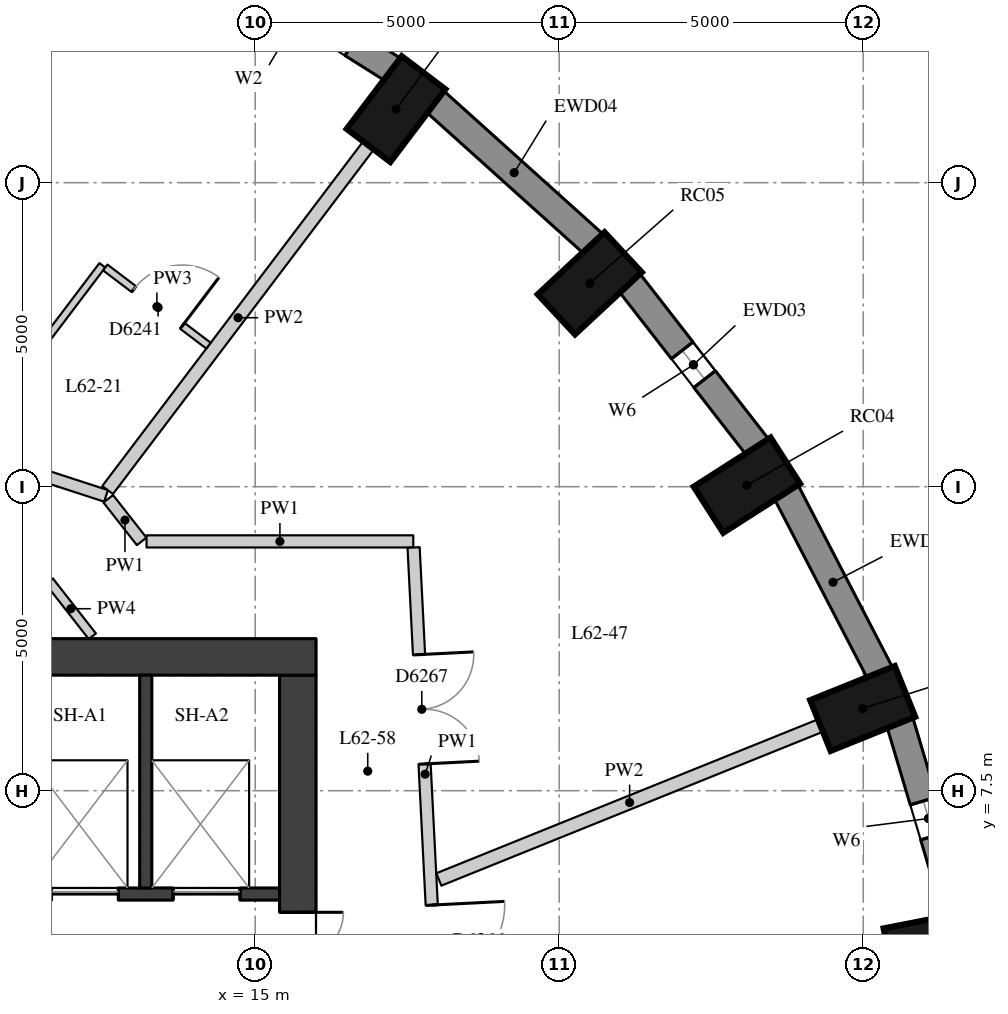
"""IFC4 building model, lengths in metres.
Left out: names, types, materials, properties, quantities, classifications, styles, units other than length and angle.
Written with IfcOpenShell. Run it as: python <this file> out.ifc"""

import sys

from ifc_helpers import new_model, si_unit, direction, frame, frame_2d, origin, origin_2d, place, context, subcontext, project, spatial, rectangle, extrude, element, fill, save


model = new_model("IFC4")
c1 = context("Model", 3, precision=1e-05, world=origin(), true_north=direction((0.0, 1.0)))
c2 = subcontext(c1, "Body", "Model", "MODEL_VIEW")
j1 = project(units=[si_unit("LENGTHUNIT", "METRE"), si_unit("PLANEANGLEUNIT", "RADIAN")], contexts=[c1])
p1 = place(None, origin())
s1 = spatial("IfcSite", under=j1, at=p1, CompositionType="ELEMENT")
p2 = place(p1, origin())
s2 = spatial("IfcBuilding", under=s1, at=p2, CompositionType="ELEMENT")
p3 = place(p2, frame((0.0, 0.0, 218.9)))
s3 = spatial("IfcBuildingStorey", under=s2, at=p3, CompositionType="ELEMENT", Elevation=218.9)
for number, where, z_axis, x_axis in (
    (1, (26.157, 4.937, 0.0), (0.0, 0.0, 1.0), (0.981, 0.192, 0.0)),
    (2, (24.991, 8.852, 0.0), (0.0, 0.0, 1.0), (0.927, 0.374, 0.0)),
    (3, (23.087, 12.525, 0.0), (0.0, 0.0, 1.0), (0.842, 0.539, 0.0)),
    (4, (20.502, 15.845, 0.0), (0.0, 0.0, 1.0), (0.732, 0.681, 0.0)),
    (5, (17.316, 18.71, 0.0), (0.0, 0.0, 1.0), (0.604, 0.797, 0.0)),
):
    element("IfcColumn", number, at=place(p3, frame(where, z_axis=z_axis, x_axis=x_axis)), inside=s3, PredefinedType="COLUMN", context=c2, shape_type="SweptSolid", body=[
        extrude(rectangle(XDim=1.5, YDim=0.9, at=origin_2d()), origin(), (0.0, 0.0, 1.0), 3.3),
    ])
p4 = place(p3, frame((26.548, 5.452, 0.0), z_axis=(0.0, 0.0, 1.0), x_axis=(-0.285444972963, 0.958395099847, 0.0)))
e6 = element("IfcWall", 6, at=p4, inside=s3, PredefinedType="SOLIDWALL", context=c2, shape_type="SweptSolid", body=[
    extrude(rectangle(XDim=3.32, YDim=0.45, at=frame_2d((1.66, 0.0))), origin(), (0.0, 0.0, 1.0), 3.02),
])
p5 = place(p4, frame((1.36, 0.0, 0.4)))
e7 = element("IfcOpeningElement", 7, at=p5, cuts=e6, PredefinedType="OPENING", context=c2, shape_type="SweptSolid", body=[
    extrude(rectangle(XDim=0.6, YDim=1.75, at=frame_2d((0.3, 0.875))), frame((0.0, 0.235, 0.0), z_axis=(0.0, -1.0, 0.0), x_axis=(1.0, 0.0, 0.0)), (0.0, 0.0, 1.0), 0.47),
])
p6 = place(p3, frame((25.278, 9.432, 0.0), z_axis=(0.0, 0.0, 1.0), x_axis=(-0.460175500475, 0.887827972505, 0.0)))
e8 = element("IfcWall", 8, at=p6, inside=s3, PredefinedType="SOLIDWALL", context=c2, shape_type="SweptSolid", body=[
    extrude(rectangle(XDim=3.371, YDim=0.45, at=frame_2d((1.685, 0.0))), origin(), (0.0, 0.0, 1.0), 3.02),
])
p7 = place(p3, frame((23.263, 13.148, 0.0), z_axis=(0.0, 0.0, 1.0), x_axis=(-0.614220816451, 0.789134201919, 0.0)))
e9 = element("IfcWall", 9, at=p7, inside=s3, PredefinedType="SOLIDWALL", context=c2, shape_type="SweptSolid", body=[
    extrude(rectangle(XDim=3.438, YDim=0.45, at=frame_2d((1.719, 0.0))), origin(), (0.0, 0.0, 1.0), 3.02),
])
p8 = place(p7, frame((1.419, 0.0, 0.4)))
e10 = element("IfcOpeningElement", 10, at=p8, cuts=e9, PredefinedType="OPENING", context=c2, shape_type="SweptSolid", body=[
    extrude(rectangle(XDim=0.6, YDim=1.75, at=frame_2d((0.3, 0.875))), frame((0.0, 0.235, 0.0), z_axis=(0.0, -1.0, 0.0), x_axis=(1.0, 0.0, 0.0)), (0.0, 0.0, 1.0), 0.47),
])
p9 = place(p3, frame((20.565, 16.49, 0.0), z_axis=(0.0, 0.0, 1.0), x_axis=(-0.743442727602, 0.668799604348, 0.0)))
e11 = element("IfcWall", 11, at=p9, inside=s3, PredefinedType="SOLIDWALL", context=c2, shape_type="SweptSolid", body=[
    extrude(rectangle(XDim=3.513, YDim=0.45, at=frame_2d((1.756, 0.0))), origin(), (0.0, 0.0, 1.0), 3.02),
])
p10 = place(p3, frame((17.267, 19.358, 0.0), z_axis=(0.0, 0.0, 1.0), x_axis=(-0.846119146727, 0.532993798783, 0.0)))
e12 = element("IfcWall", 12, at=p10, inside=s3, PredefinedType="SOLIDWALL", context=c2, shape_type="SweptSolid", body=[
    extrude(rectangle(XDim=3.587, YDim=0.45, at=frame_2d((1.793, 0.0))), origin(), (0.0, 0.0, 1.0), 3.02),
])
p11 = place(p10, frame((0.793, 0.0, 0.4)))
e13 = element("IfcOpeningElement", 13, at=p11, cuts=e12, PredefinedType="OPENING", context=c2, shape_type="SweptSolid", body=[
    extrude(rectangle(XDim=2.0, YDim=1.75, at=frame_2d((1.0, 0.875))), frame((0.0, 0.235, 0.0), z_axis=(0.0, -1.0, 0.0), x_axis=(1.0, 0.0, 0.0)), (0.0, 0.0, 1.0), 0.47),
])
p12 = place(p3, frame((15.7, -9.4, 0.0), z_axis=(0.0, 0.0, 1.0), x_axis=(0.0, 1.0, 0.0)))
e14 = element("IfcWall", 14, at=p12, inside=s3, PredefinedType="SHEAR", context=c2, shape_type="SweptSolid", body=[
    extrude(rectangle(XDim=18.8, YDim=0.6, at=frame_2d((9.4, 0.0))), origin(), (0.0, 0.0, 1.0), 3.02),
])
p13 = place(p12, frame((13.4, 0.0, 0.0)))
e15 = element("IfcOpeningElement", 15, at=p13, cuts=e14, PredefinedType="OPENING", context=c2, shape_type="SweptSolid", body=[
    extrude(rectangle(XDim=1.5, YDim=2.1, at=frame_2d((0.75, 1.05))), frame((0.0, 0.31, 0.0), z_axis=(0.0, -1.0, 0.0), x_axis=(1.0, 0.0, 0.0)), (0.0, 0.0, 1.0), 0.62),
])
p14 = place(p12, frame((3.9, 0.0, 0.0)))
e16 = element("IfcOpeningElement", 16, at=p14, cuts=e14, PredefinedType="OPENING", context=c2, shape_type="SweptSolid", body=[
    extrude(rectangle(XDim=1.5, YDim=2.1, at=frame_2d((0.75, 1.05))), frame((0.0, 0.31, 0.0), z_axis=(0.0, -1.0, 0.0), x_axis=(1.0, 0.0, 0.0)), (0.0, 0.0, 1.0), 0.62),
])
p15 = place(p3, frame((4.0, 9.7, 0.0), z_axis=(0.0, 0.0, 1.0), x_axis=(1.0, 0.0, 0.0)))
e17 = element("IfcWall", 17, at=p15, inside=s3, PredefinedType="SHEAR", context=c2, shape_type="SweptSolid", body=[
    extrude(rectangle(XDim=12.0, YDim=0.6, at=frame_2d((6.0, 0.0))), origin(), (0.0, 0.0, 1.0), 3.02),
])
p16 = place(p3, frame((4.6, 5.8, 0.0), z_axis=(0.0, 0.0, 1.0), x_axis=(1.0, 0.0, 0.0)))
e18 = element("IfcWall", 18, at=p16, inside=s3, PredefinedType="SHEAR", context=c2, shape_type="SweptSolid", body=[
    extrude(rectangle(XDim=10.8, YDim=0.2, at=frame_2d((5.4, 0.0))), origin(), (0.0, 0.0, 1.0), 3.02),
])
p17 = place(p16, frame((7.05, 0.0, 0.0)))
e19 = element("IfcOpeningElement", 19, at=p17, cuts=e18, PredefinedType="OPENING", context=c2, shape_type="SweptSolid", body=[
    extrude(rectangle(XDim=1.1, YDim=2.1, at=frame_2d((0.55, 1.05))), frame((0.0, 0.11, 0.0), z_axis=(0.0, -1.0, 0.0), x_axis=(1.0, 0.0, 0.0)), (0.0, 0.0, 1.0), 0.22),
])
p18 = place(p16, frame((9.05, 0.0, 0.0)))
e20 = element("IfcOpeningElement", 20, at=p18, cuts=e18, PredefinedType="OPENING", context=c2, shape_type="SweptSolid", body=[
    extrude(rectangle(XDim=1.1, YDim=2.1, at=frame_2d((0.55, 1.05))), frame((0.0, 0.11, 0.0), z_axis=(0.0, -1.0, 0.0), x_axis=(1.0, 0.0, 0.0)), (0.0, 0.0, 1.0), 0.22),
])
p19 = place(p3, frame((13.2, 5.9, 0.0), z_axis=(0.0, 0.0, 1.0), x_axis=(0.0, 1.0, 0.0)))
e21 = element("IfcWall", 21, at=p19, inside=s3, PredefinedType="SHEAR", context=c2, shape_type="SweptSolid", body=[
    extrude(rectangle(XDim=3.5, YDim=0.2, at=frame_2d((1.75, 0.0))), origin(), (0.0, 0.0, 1.0), 3.02),
])
p20 = place(p3, frame((0.795, 16.169, 0.0), z_axis=(0.0, 0.0, 1.0), x_axis=(0.950998491074, -0.309195520626, 0.0)))
e22 = element("IfcWall", 22, at=p20, inside=s3, PredefinedType="PARTITIONING", context=c2, shape_type="SweptSolid", body=[
    extrude(rectangle(XDim=12.357, YDim=0.2, at=frame_2d((6.179, 0.0))), origin(), (0.0, 0.0, 1.0), 3.02),
])
p21 = place(p20, frame((8.496, 0.0, 0.0)))
e23 = element("IfcOpeningElement", 23, at=p21, cuts=e22, PredefinedType="OPENING", context=c2, shape_type="SweptSolid", body=[
    extrude(rectangle(XDim=1.1, YDim=2.1, at=frame_2d((0.55, 1.05))), frame((0.0, 0.11, 0.0), z_axis=(0.0, -1.0, 0.0), x_axis=(1.0, 0.0, 0.0)), (0.0, 0.0, 1.0), 0.22),
])
p22 = place(p20, frame((4.169, 0.0, 0.0)))
e24 = element("IfcOpeningElement", 24, at=p22, cuts=e22, PredefinedType="OPENING", context=c2, shape_type="SweptSolid", body=[
    extrude(rectangle(XDim=0.9, YDim=2.1, at=frame_2d((0.45, 1.05))), frame((0.0, 0.11, 0.0), z_axis=(0.0, -1.0, 0.0), x_axis=(1.0, 0.0, 0.0)), (0.0, 0.0, 1.0), 0.22),
])
p23 = place(p20, frame((0.747, 0.0, 0.0)))
e25 = element("IfcOpeningElement", 25, at=p23, cuts=e22, PredefinedType="OPENING", context=c2, shape_type="SweptSolid", body=[
    extrude(rectangle(XDim=0.9, YDim=2.1, at=frame_2d((0.45, 1.05))), frame((0.0, 0.11, 0.0), z_axis=(0.0, -1.0, 0.0), x_axis=(1.0, 0.0, 0.0)), (0.0, 0.0, 1.0), 0.22),
])
p24 = place(p3, frame((12.583, 12.301, 0.0), z_axis=(0.0, 0.0, 1.0), x_axis=(0.616670471626, -0.787221397972, 0.0)))
e26 = element("IfcWall", 26, at=p24, inside=s3, PredefinedType="PARTITIONING", context=c2, shape_type="SweptSolid", body=[
    extrude(rectangle(XDim=0.89, YDim=0.2, at=frame_2d((0.445, 0.0))), origin(), (0.0, 0.0, 1.0), 3.02),
])
p25 = place(p3, frame((13.213, 11.6, 0.0), z_axis=(0.0, 0.0, 1.0), x_axis=(1.0, 0.0, 0.0)))
e27 = element("IfcWall", 27, at=p25, inside=s3, PredefinedType="PARTITIONING", context=c2, shape_type="SweptSolid", body=[
    extrude(rectangle(XDim=4.387, YDim=0.2, at=frame_2d((2.194, 0.0))), origin(), (0.0, 0.0, 1.0), 3.02),
])
p26 = place(p3, frame((17.605, 11.5, 0.0), z_axis=(0.0, 0.0, 1.0), x_axis=(0.050646981223, -0.998716618112, 0.0)))
e28 = element("IfcWall", 28, at=p26, inside=s3, PredefinedType="PARTITIONING", context=c2, shape_type="SweptSolid", body=[
    extrude(rectangle(XDim=7.467, YDim=0.2, at=frame_2d((3.733, 0.0))), origin(), (0.0, 0.0, 1.0), 3.02),
])
p27 = place(p26, frame((5.889, 0.0, 0.0)))
e29 = element("IfcOpeningElement", 29, at=p27, cuts=e28, PredefinedType="OPENING", context=c2, shape_type="SweptSolid", body=[
    extrude(rectangle(XDim=1.2, YDim=2.1, at=frame_2d((0.6, 1.05))), frame((0.0, 0.11, 0.0), z_axis=(0.0, -1.0, 0.0), x_axis=(1.0, 0.0, 0.0)), (0.0, 0.0, 1.0), 0.22),
])
p28 = place(p26, frame((1.765, 0.0, 0.0)))
e30 = element("IfcOpeningElement", 30, at=p28, cuts=e28, PredefinedType="OPENING", context=c2, shape_type="SweptSolid", body=[
    extrude(rectangle(XDim=1.8, YDim=2.1, at=frame_2d((0.9, 1.05))), frame((0.0, 0.11, 0.0), z_axis=(0.0, -1.0, 0.0), x_axis=(1.0, 0.0, 0.0)), (0.0, 0.0, 1.0), 0.22),
])
p29 = place(p3, frame((11.612, 10.946, 0.0), z_axis=(0.0, 0.0, 1.0), x_axis=(0.616228210046, -0.787567643535, 0.0)))
e31 = element("IfcWall", 31, at=p29, inside=s3, PredefinedType="PARTITIONING", context=c2, shape_type="SweptSolid", body=[
    extrude(rectangle(XDim=1.151, YDim=0.15, at=frame_2d((0.576, 0.0))), origin(), (0.0, 0.0, 1.0), 3.02),
])
p30 = place(p3, frame((24.295, 8.571, 0.0), z_axis=(0.0, 0.0, 1.0), x_axis=(-0.927397869515, -0.374076451569, 0.0)))
e32 = element("IfcWall", 32, at=p30, inside=s3, PredefinedType="PARTITIONING", context=c2, shape_type="SweptSolid", body=[
    extrude(rectangle(XDim=6.767, YDim=0.22, at=frame_2d((3.383, 0.0))), origin(), (0.0, 0.0, 1.0), 3.02),
])
p31 = place(p3, frame((16.863, 18.113, 0.0), z_axis=(0.0, 0.0, 1.0), x_axis=(-0.603604387564, -0.79728397909, 0.0)))
e33 = element("IfcWall", 33, at=p31, inside=s3, PredefinedType="PARTITIONING", context=c2, shape_type="SweptSolid", body=[
    extrude(rectangle(XDim=7.108, YDim=0.22, at=frame_2d((3.554, 0.0))), origin(), (0.0, 0.0, 1.0), 3.02),
])
p32 = place(p3, frame((10.27, 13.214, 0.0), z_axis=(0.0, 0.0, 1.0), x_axis=(0.603632344714, 0.797262812638, 0.0)))
e34 = element("IfcWall", 34, at=p32, inside=s3, PredefinedType="PARTITIONING", context=c2, shape_type="SweptSolid", body=[
    extrude(rectangle(XDim=3.672, YDim=0.12, at=frame_2d((1.836, 0.0))), origin(), (0.0, 0.0, 1.0), 3.02),
])
p33 = place(p3, frame((12.534, 16.105, 0.0), z_axis=(0.0, 0.0, 1.0), x_axis=(0.797282665226, -0.603606123005, 0.0)))
e35 = element("IfcWall", 35, at=p33, inside=s3, PredefinedType="PARTITIONING", context=c2, shape_type="SweptSolid", body=[
    extrude(rectangle(XDim=2.13, YDim=0.12, at=frame_2d((1.065, 0.0))), origin(), (0.0, 0.0, 1.0), 3.02),
])
p34 = place(p33, frame((0.59, 0.0, 0.0)))
e36 = element("IfcOpeningElement", 36, at=p34, cuts=e35, PredefinedType="OPENING", context=c2, shape_type="SweptSolid", body=[
    extrude(rectangle(XDim=1.0, YDim=2.1, at=frame_2d((0.5, 1.05))), frame((0.0, 0.07, 0.0), z_axis=(0.0, -1.0, 0.0), x_axis=(1.0, 0.0, 0.0)), (0.0, 0.0, 1.0), 0.14),
])
p35 = place(p5, origin())
e37 = element("IfcWindow", 37, at=p35, inside=s3, PartitioningType="SINGLE_PANEL", PredefinedType="WINDOW", context=c2, shape_type="SweptSolid", body=[
    extrude(rectangle(XDim=0.6, YDim=1.75, at=frame_2d((0.3, 0.875))), frame((0.0, 0.035, 0.0), z_axis=(0.0, -1.0, 0.0), x_axis=(1.0, 0.0, 0.0)), (0.0, 0.0, 1.0), 0.06),
])
fill(e7, e37)
p36 = place(p8, origin())
e38 = element("IfcWindow", 38, at=p36, inside=s3, PartitioningType="SINGLE_PANEL", PredefinedType="WINDOW", context=c2, shape_type="SweptSolid", body=[
    extrude(rectangle(XDim=0.6, YDim=1.75, at=frame_2d((0.3, 0.875))), frame((0.0, 0.035, 0.0), z_axis=(0.0, -1.0, 0.0), x_axis=(1.0, 0.0, 0.0)), (0.0, 0.0, 1.0), 0.06),
])
fill(e10, e38)
p37 = place(p13, origin())
e39 = element("IfcDoor", 39, at=p37, inside=s3, OperationType="DOUBLE_DOOR_SINGLE_SWING", PredefinedType="DOOR", context=c2, shape_type="SweptSolid", body=[
    extrude(rectangle(XDim=1.5, YDim=2.1, at=frame_2d((0.75, 1.05))), frame((0.0, 0.025, 0.0), z_axis=(0.0, -1.0, 0.0), x_axis=(1.0, 0.0, 0.0)), (0.0, 0.0, 1.0), 0.05),
])
fill(e15, e39)
p38 = place(p17, origin())
e40 = element("IfcDoor", 40, at=p38, inside=s3, OperationType="DOUBLE_DOOR_SLIDING", PredefinedType="DOOR", context=c2, shape_type="SweptSolid", body=[
    extrude(rectangle(XDim=1.1, YDim=2.1, at=frame_2d((0.55, 1.05))), frame((0.0, 0.025, 0.0), z_axis=(0.0, -1.0, 0.0), x_axis=(1.0, 0.0, 0.0)), (0.0, 0.0, 1.0), 0.05),
])
fill(e19, e40)
p39 = place(p18, origin())
e41 = element("IfcDoor", 41, at=p39, inside=s3, OperationType="DOUBLE_DOOR_SLIDING", PredefinedType="DOOR", context=c2, shape_type="SweptSolid", body=[
    extrude(rectangle(XDim=1.1, YDim=2.1, at=frame_2d((0.55, 1.05))), frame((0.0, 0.025, 0.0), z_axis=(0.0, -1.0, 0.0), x_axis=(1.0, 0.0, 0.0)), (0.0, 0.0, 1.0), 0.05),
])
fill(e20, e41)
p40 = place(p34, origin())
e42 = element("IfcDoor", 42, at=p40, inside=s3, OperationType="SINGLE_SWING_RIGHT", PredefinedType="DOOR", context=c2, shape_type="SweptSolid", body=[
    extrude(rectangle(XDim=1.0, YDim=2.1, at=frame_2d((0.5, 1.05))), frame((0.0, 0.025, 0.0), z_axis=(0.0, -1.0, 0.0), x_axis=(1.0, 0.0, 0.0)), (0.0, 0.0, 1.0), 0.05),
])
fill(e36, e42)
p41 = place(p27, origin())
e43 = element("IfcDoor", 43, at=p41, inside=s3, OperationType="SINGLE_SWING_LEFT", PredefinedType="DOOR", context=c2, shape_type="SweptSolid", body=[
    extrude(rectangle(XDim=1.2, YDim=2.1, at=frame_2d((0.6, 1.05))), frame((0.0, 0.025, 0.0), z_axis=(0.0, -1.0, 0.0), x_axis=(1.0, 0.0, 0.0)), (0.0, 0.0, 1.0), 0.05),
])
fill(e29, e43)
p42 = place(p28, origin())
e44 = element("IfcDoor", 44, at=p42, inside=s3, OperationType="DOUBLE_DOOR_SINGLE_SWING", PredefinedType="DOOR", context=c2, shape_type="SweptSolid", body=[
    extrude(rectangle(XDim=1.8, YDim=2.1, at=frame_2d((0.9, 1.05))), frame((0.0, 0.025, 0.0), z_axis=(0.0, -1.0, 0.0), x_axis=(1.0, 0.0, 0.0)), (0.0, 0.0, 1.0), 0.05),
])
fill(e30, e44)
save(model, sys.argv[1])
